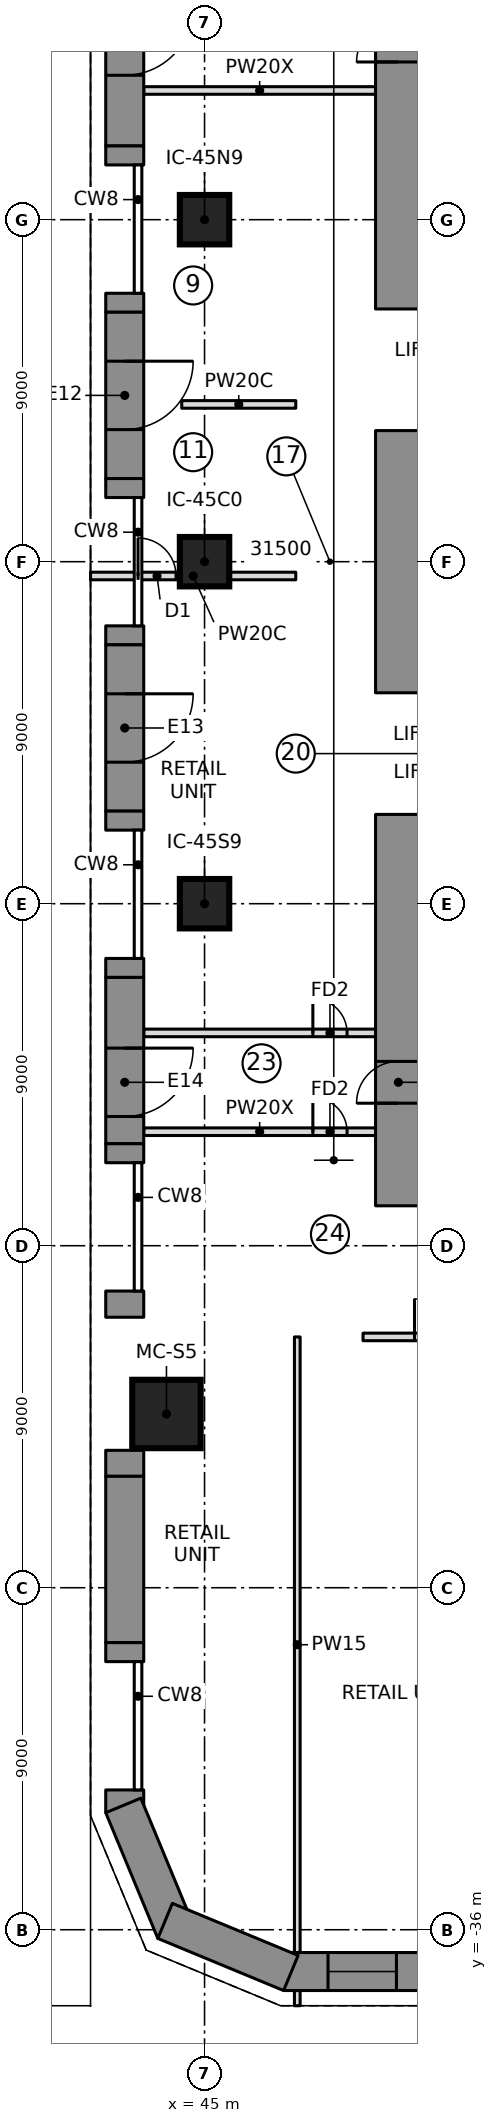
"""IFC4 building model, lengths in metres.
Left out: names, types, materials, properties, quantities, classifications, styles, units other than length and angle.
Written with IfcOpenShell. Run it as: python <this file> out.ifc"""

import sys

from ifc_helpers import new_model, si_unit, direction, frame, frame_2d, origin, origin_2d, place, context, subcontext, project, spatial, polyline, rectangle, outline, extrude, element, fill, save


model = new_model("IFC4")
c1 = context("Model", 3, precision=1e-05, world=origin(), true_north=direction((0.0, 1.0)))
c2 = subcontext(c1, "Body", "Model", "MODEL_VIEW")
j1 = project(units=[si_unit("LENGTHUNIT", "METRE"), si_unit("PLANEANGLEUNIT", "RADIAN")], contexts=[c1])
p1 = place(None, origin())
s1 = spatial("IfcSite", under=j1, at=p1, CompositionType="ELEMENT")
p2 = place(p1, origin())
s2 = spatial("IfcBuilding", under=s1, at=p2, CompositionType="ELEMENT")
p3 = place(p2, origin())
s3 = spatial("IfcBuildingStorey", under=s2, at=p3, CompositionType="ELEMENT", Elevation=0.0)
p4 = place(p3, frame((50.1, 6.65, 0.0), z_axis=(0.0, 0.0, 1.0), x_axis=(0.0, 1.0, 0.0)))
e1 = element("IfcWall", 1, at=p4, inside=s3, PredefinedType="SHEAR", context=c2, shape_type="SweptSolid", body=[
    extrude(rectangle(XDim=10.3, YDim=1.2, at=frame_2d((5.15, 0.0))), origin(), (0.0, 0.0, 1.0), 8.0),
])
p5 = place(p4, frame((6.5, 0.0, 0.0)))
e2 = element("IfcOpeningElement", 2, at=p5, cuts=e1, PredefinedType="OPENING", context=c2, shape_type="SweptSolid", body=[
    extrude(rectangle(XDim=1.1, YDim=2.1, at=frame_2d((0.55, 1.05))), frame((0.0, 0.61, 0.0), z_axis=(0.0, -1.0, 0.0), x_axis=(1.0, 0.0, 0.0)), (0.0, 0.0, 1.0), 1.22),
])
p6 = place(p3, frame((50.1, -3.45, 0.0), z_axis=(0.0, 0.0, 1.0), x_axis=(0.0, 1.0, 0.0)))
e3 = element("IfcWall", 3, at=p6, inside=s3, PredefinedType="SHEAR", context=c2, shape_type="SweptSolid", body=[
    extrude(rectangle(XDim=6.9, YDim=1.2, at=frame_2d((3.45, 0.0))), origin(), (0.0, 0.0, 1.0), 8.0),
])
p7 = place(p3, frame((50.1, -16.95, 0.0), z_axis=(0.0, 0.0, 1.0), x_axis=(0.0, 1.0, 0.0)))
e4 = element("IfcWall", 4, at=p7, inside=s3, PredefinedType="SHEAR", context=c2, shape_type="SweptSolid", body=[
    extrude(rectangle(XDim=10.3, YDim=1.2, at=frame_2d((5.15, 0.0))), origin(), (0.0, 0.0, 1.0), 8.0),
])
p8 = place(p7, frame((2.7, 0.0, 0.0)))
e5 = element("IfcOpeningElement", 5, at=p8, cuts=e4, PredefinedType="OPENING", context=c2, shape_type="SweptSolid", body=[
    extrude(rectangle(XDim=1.1, YDim=2.1, at=frame_2d((0.55, 1.05))), frame((0.0, 0.61, 0.0), z_axis=(0.0, -1.0, 0.0), x_axis=(1.0, 0.0, 0.0)), (0.0, 0.0, 1.0), 1.22),
])
p9 = place(p3, frame((43.998, -22.428, 0.0), z_axis=(0.0, 0.0, 1.0), x_axis=(1.0, 0.0, 0.0)))
e6 = element("IfcColumn", 6, at=p9, inside=s3, PredefinedType="COLUMN", context=c2, shape_type="SweptSolid", body=[
    extrude(rectangle(XDim=1.8, YDim=1.8, at=origin_2d()), origin(), (0.0, 0.0, 1.0), 8.0),
])
for number, where, z_axis, x_axis in (
    (7, (45.0, -9.0, 0.0), (0.0, 0.0, 1.0), (1.0, 0.0, 0.0)),
    (8, (45.0, 0.0, 0.0), (0.0, 0.0, 1.0), (1.0, 0.0, 0.0)),
    (9, (45.0, 9.0, 0.0), (0.0, 0.0, 1.0), (1.0, 0.0, 0.0)),
):
    element("IfcColumn", number, at=place(p3, frame(where, z_axis=z_axis, x_axis=x_axis)), inside=s3, PredefinedType="COLUMN", context=c2, shape_type="SweptSolid", body=[
        extrude(rectangle(XDim=1.3, YDim=1.3, at=origin_2d()), origin(), (0.0, 0.0, 1.0), 8.0),
    ])
p10 = place(p2, frame((0.0, 0.0, -10.0)))
s4 = spatial("IfcBuildingStorey", under=s2, at=p10, CompositionType="ELEMENT", Elevation=-10.0)
p11 = place(p10, frame((41.69, -21.429, -0.3), z_axis=(0.0, 0.0, 1.0), x_axis=(0.888406364692, -0.459057873449, 0.0)))
e10 = element("IfcWall", 10, at=p11, inside=s4, PredefinedType="SHEAR", context=c2, shape_type="SweptSolid", body=[
    extrude(rectangle(XDim=1.529, YDim=3.4, at=frame_2d((0.764, 0.0))), origin(), (0.0, 0.0, 1.0), 15.3),
])
p12 = place(p3, frame((47.179, -37.1, 0.0), z_axis=(0.0, 0.0, 1.0), x_axis=(1.0, 0.0, 0.0)))
e11 = element("IfcWall", 11, at=p12, inside=s3, PredefinedType="NOTDEFINED", context=c2, shape_type="SweptSolid", body=[
    extrude(outline(polyline([(-0.1, -0.5), (3.94, -0.5), (3.94, 0.5), (0.1, 0.5), (-0.1, -0.5)])), origin(), (0.0, 0.0, 1.0), 7.7),
])
p13 = place(p12, frame((1.07, 0.0, 0.9)))
e12 = element("IfcOpeningElement", 12, at=p13, cuts=e11, PredefinedType="OPENING", context=c2, shape_type="SweptSolid", body=[
    extrude(rectangle(XDim=1.8, YDim=2.4, at=frame_2d((0.9, 1.2))), frame((0.0, 0.51, 0.0), z_axis=(0.0, -1.0, 0.0), x_axis=(1.0, 0.0, 0.0)), (0.0, 0.0, 1.0), 1.02),
])
p14 = place(p3, frame((42.9, 15.316, 0.0), z_axis=(0.0, 0.0, 1.0), x_axis=(0.0, -1.0, 0.0)))
e13 = element("IfcWall", 13, at=p14, inside=s3, PredefinedType="NOTDEFINED", context=c2, shape_type="SweptSolid", body=[
    extrude(outline(polyline([(0.0, -0.5), (4.376, -0.5), (4.376, 0.5), (0.0, 0.5), (0.0, -0.5)])), origin(), (0.0, 0.0, 1.0), 7.7),
])
p15 = place(p14, frame((0.717, 0.0, 0.0)))
e14 = element("IfcOpeningElement", 14, at=p15, cuts=e13, PredefinedType="OPENING", context=c2, shape_type="SweptSolid", body=[
    extrude(rectangle(XDim=1.8, YDim=2.4, at=frame_2d((0.9, 1.2))), frame((0.0, 0.51, 0.0), z_axis=(0.0, -1.0, 0.0), x_axis=(1.0, 0.0, 0.0)), (0.0, 0.0, 1.0), 1.02),
])
for number, where, z_axis, x_axis in (
    (15, (42.9, 10.94, 0.0), (0.0, 0.0, 1.0), (0.0, -1.0, 0.0)),
    (16, (42.9, 7.064, 0.0), (0.0, 0.0, 1.0), (0.0, -1.0, 0.0)),
):
    element("IfcWall", number, at=place(p3, frame(where, z_axis=z_axis, x_axis=x_axis)), inside=s3, PredefinedType="NOTDEFINED", context=c2, shape_type="SweptSolid", body=[
        extrude(outline(polyline([(0.0, -0.5), (0.5, -0.5), (0.5, 0.5), (0.0, 0.5), (0.0, -0.5)])), origin(), (0.0, 0.0, 1.0), 7.7),
    ])
p16 = place(p3, frame((42.9, 6.564, 0.0), z_axis=(0.0, 0.0, 1.0), x_axis=(0.0, -1.0, 0.0)))
e17 = element("IfcWall", 17, at=p16, inside=s3, PredefinedType="NOTDEFINED", context=c2, shape_type="SweptSolid", body=[
    extrude(outline(polyline([(0.0, -0.5), (4.376, -0.5), (4.376, 0.5), (0.0, 0.5), (0.0, -0.5)])), origin(), (0.0, 0.0, 1.0), 7.7),
])
p17 = place(p16, frame((1.288, 0.0, 0.0)))
e18 = element("IfcOpeningElement", 18, at=p17, cuts=e17, PredefinedType="OPENING", context=c2, shape_type="SweptSolid", body=[
    extrude(rectangle(XDim=1.8, YDim=2.4, at=frame_2d((0.9, 1.2))), frame((0.0, 0.51, 0.0), z_axis=(0.0, -1.0, 0.0), x_axis=(1.0, 0.0, 0.0)), (0.0, 0.0, 1.0), 1.02),
])
for number, where, z_axis, x_axis in (
    (19, (42.9, 2.188, 0.0), (0.0, 0.0, 1.0), (0.0, -1.0, 0.0)),
    (20, (42.9, -1.688, 0.0), (0.0, 0.0, 1.0), (0.0, -1.0, 0.0)),
):
    element("IfcWall", number, at=place(p3, frame(where, z_axis=z_axis, x_axis=x_axis)), inside=s3, PredefinedType="NOTDEFINED", context=c2, shape_type="SweptSolid", body=[
        extrude(outline(polyline([(0.0, -0.5), (0.5, -0.5), (0.5, 0.5), (0.0, 0.5), (0.0, -0.5)])), origin(), (0.0, 0.0, 1.0), 7.7),
    ])
p18 = place(p3, frame((42.9, -2.188, 0.0), z_axis=(0.0, 0.0, 1.0), x_axis=(0.0, -1.0, 0.0)))
e21 = element("IfcWall", 21, at=p18, inside=s3, PredefinedType="NOTDEFINED", context=c2, shape_type="SweptSolid", body=[
    extrude(outline(polyline([(0.0, -0.5), (4.376, -0.5), (4.376, 0.5), (0.0, 0.5), (0.0, -0.5)])), origin(), (0.0, 0.0, 1.0), 7.7),
])
p19 = place(p18, frame((1.288, 0.0, 0.0)))
e22 = element("IfcOpeningElement", 22, at=p19, cuts=e21, PredefinedType="OPENING", context=c2, shape_type="SweptSolid", body=[
    extrude(rectangle(XDim=1.8, YDim=2.4, at=frame_2d((0.9, 1.2))), frame((0.0, 0.51, 0.0), z_axis=(0.0, -1.0, 0.0), x_axis=(1.0, 0.0, 0.0)), (0.0, 0.0, 1.0), 1.02),
])
for number, where, z_axis, x_axis in (
    (23, (42.9, -6.564, 0.0), (0.0, 0.0, 1.0), (0.0, -1.0, 0.0)),
    (24, (42.9, -10.44, 0.0), (0.0, 0.0, 1.0), (0.0, -1.0, 0.0)),
):
    element("IfcWall", number, at=place(p3, frame(where, z_axis=z_axis, x_axis=x_axis)), inside=s3, PredefinedType="NOTDEFINED", context=c2, shape_type="SweptSolid", body=[
        extrude(outline(polyline([(0.0, -0.5), (0.5, -0.5), (0.5, 0.5), (0.0, 0.5), (0.0, -0.5)])), origin(), (0.0, 0.0, 1.0), 7.7),
    ])
p20 = place(p3, frame((42.9, -10.94, 0.0), z_axis=(0.0, 0.0, 1.0), x_axis=(0.0, -1.0, 0.0)))
e25 = element("IfcWall", 25, at=p20, inside=s3, PredefinedType="NOTDEFINED", context=c2, shape_type="SweptSolid", body=[
    extrude(outline(polyline([(0.0, -0.5), (4.376, -0.5), (4.376, 0.5), (0.0, 0.5), (0.0, -0.5)])), origin(), (0.0, 0.0, 1.0), 7.7),
])
p21 = place(p20, frame((1.86, 0.0, 0.0)))
e26 = element("IfcOpeningElement", 26, at=p21, cuts=e25, PredefinedType="OPENING", context=c2, shape_type="SweptSolid", body=[
    extrude(rectangle(XDim=1.8, YDim=2.4, at=frame_2d((0.9, 1.2))), frame((0.0, 0.51, 0.0), z_axis=(0.0, -1.0, 0.0), x_axis=(1.0, 0.0, 0.0)), (0.0, 0.0, 1.0), 1.02),
])
p22 = place(p3, frame((42.9, -15.316, 0.0), z_axis=(0.0, 0.0, 1.0), x_axis=(0.0, -1.0, 0.0)))
e27 = element("IfcWall", 27, at=p22, inside=s3, PredefinedType="NOTDEFINED", context=c2, shape_type="SweptSolid", body=[
    extrude(outline(polyline([(0.0, -0.5), (0.5, -0.5), (0.5, 0.5), (0.0, 0.5), (0.0, -0.5)])), origin(), (0.0, 0.0, 1.0), 7.7),
])
p23 = place(p3, frame((42.9, -19.193, 0.0), z_axis=(0.0, 0.0, 1.0), x_axis=(0.0, -1.0, 0.0)))
e28 = element("IfcWall", 28, at=p23, inside=s3, PredefinedType="NOTDEFINED", context=c2, shape_type="SweptSolid", body=[
    extrude(outline(polyline([(0.0, -0.5), (0.69, -0.5), (1.207, 0.5), (0.0, 0.5), (0.0, -0.5)])), origin(), (0.0, 0.0, 1.0), 7.7),
])
p24 = place(p3, frame((42.9, -22.417, 0.0), z_axis=(0.0, 0.0, 1.0), x_axis=(0.0, -1.0, 0.0)))
e29 = element("IfcWall", 29, at=p24, inside=s3, PredefinedType="NOTDEFINED", context=c2, shape_type="SweptSolid", body=[
    extrude(outline(polyline([(0.968, -0.5), (1.652, -0.5), (1.652, 0.5), (-0.968, 0.5), (0.968, -0.5)])), origin(), (0.0, 0.0, 1.0), 7.7),
])
p25 = place(p3, frame((42.9, -24.069, 0.0), z_axis=(0.0, 0.0, 1.0), x_axis=(0.0, -1.0, 0.0)))
e30 = element("IfcWall", 30, at=p25, inside=s3, PredefinedType="NOTDEFINED", context=c2, shape_type="SweptSolid", body=[
    extrude(outline(polyline([(0.0, -0.5), (4.376, -0.5), (4.376, 0.5), (0.0, 0.5), (0.0, -0.5)])), origin(), (0.0, 0.0, 1.0), 7.7),
])
p26 = place(p3, frame((42.9, -28.445, 0.0), z_axis=(0.0, 0.0, 1.0), x_axis=(0.0, -1.0, 0.0)))
e31 = element("IfcWall", 31, at=p26, inside=s3, PredefinedType="NOTDEFINED", context=c2, shape_type="SweptSolid", body=[
    extrude(outline(polyline([(0.0, -0.5), (0.5, -0.5), (0.5, 0.5), (0.0, 0.5), (0.0, -0.5)])), origin(), (0.0, 0.0, 1.0), 7.7),
])
p27 = place(p3, frame((42.9, -32.321, 0.0), z_axis=(0.0, 0.0, 1.0), x_axis=(0.0, -1.0, 0.0)))
e32 = element("IfcWall", 32, at=p27, inside=s3, PredefinedType="NOTDEFINED", context=c2, shape_type="SweptSolid", body=[
    extrude(outline(polyline([(0.0, -0.5), (0.6, -0.5), (0.4, 0.5), (0.0, 0.5), (0.0, -0.5)])), origin(), (0.0, 0.0, 1.0), 7.7),
])
p28 = place(p3, frame((42.9, -32.821, 0.0), z_axis=(0.0, 0.0, 1.0), x_axis=(0.382724875529, -0.923862365102, 0.0)))
e33 = element("IfcWall", 33, at=p28, inside=s3, PredefinedType="NOTDEFINED", context=c2, shape_type="SweptSolid", body=[
    extrude(outline(polyline([(-0.1, -0.5), (3.482, -0.5), (3.068, 0.5), (0.1, 0.5), (-0.1, -0.5)])), origin(), (0.0, 0.0, 1.0), 7.7),
])
p29 = place(p3, frame((44.153, -35.847, 0.0), z_axis=(0.0, 0.0, 1.0), x_axis=(0.923862365102, -0.382724875529, 0.0)))
e34 = element("IfcWall", 34, at=p29, inside=s3, PredefinedType="NOTDEFINED", context=c2, shape_type="SweptSolid", body=[
    extrude(outline(polyline([(-0.207, -0.5), (3.375, -0.5), (3.175, 0.5), (0.207, 0.5), (-0.207, -0.5)])), origin(), (0.0, 0.0, 1.0), 7.7),
])
p30 = place(p3, frame((42.0, -0.376, 0.0), z_axis=(0.0, 0.0, 1.0), x_axis=(1.0, 0.0, 0.0)))
e35 = element("IfcWall", 35, at=p30, inside=s3, PredefinedType="PARTITIONING", context=c2, shape_type="SweptSolid", body=[
    extrude(rectangle(XDim=5.401, YDim=0.2, at=frame_2d((2.7, 0.0))), origin(), (0.0, 0.0, 1.0), 7.65),
])
p31 = place(p30, frame((1.25, 0.0, 0.0)))
e36 = element("IfcOpeningElement", 36, at=p31, cuts=e35, PredefinedType="OPENING", context=c2, shape_type="SweptSolid", body=[
    extrude(rectangle(XDim=1.0, YDim=2.1, at=frame_2d((0.5, 1.05))), frame((0.0, 0.11, 0.0), z_axis=(0.0, -1.0, 0.0), x_axis=(1.0, 0.0, 0.0)), (0.0, 0.0, 1.0), 0.22),
])
p32 = place(p3, frame((47.44, -38.0, 0.0), z_axis=(0.0, 0.0, 1.0), x_axis=(0.0, 1.0, 0.0)))
e37 = element("IfcWall", 37, at=p32, inside=s3, PredefinedType="PARTITIONING", context=c2, shape_type="SweptSolid", body=[
    extrude(rectangle(XDim=0.4, YDim=0.15, at=frame_2d((0.2, 0.0))), origin(), (0.0, 0.0, 1.0), 7.65),
])
p33 = place(p3, frame((47.44, -36.6, 0.0), z_axis=(0.0, 0.0, 1.0), x_axis=(0.0, 1.0, 0.0)))
e38 = element("IfcWall", 38, at=p33, inside=s3, PredefinedType="PARTITIONING", context=c2, shape_type="SweptSolid", body=[
    extrude(rectangle(XDim=16.2, YDim=0.15, at=frame_2d((8.1, 0.0))), origin(), (0.0, 0.0, 1.0), 7.65),
])
p34 = place(p3, frame((44.4, 4.139, 0.0), z_axis=(0.0, 0.0, 1.0), x_axis=(1.0, 0.0, 0.0)))
e39 = element("IfcWall", 39, at=p34, inside=s3, PredefinedType="PARTITIONING", context=c2, shape_type="SweptSolid", body=[
    extrude(rectangle(XDim=3.001, YDim=0.2, at=frame_2d((1.5, 0.0))), origin(), (0.0, 0.0, 1.0), 7.65),
])
p35 = place(p3, frame((49.17, -20.4, 0.0), z_axis=(0.0, 0.0, 1.0), x_axis=(1.0, 0.0, 0.0)))
e40 = element("IfcWall", 40, at=p35, inside=s3, PredefinedType="PARTITIONING", context=c2, shape_type="SweptSolid", body=[
    extrude(rectangle(XDim=3.71, YDim=0.2, at=frame_2d((1.855, 0.0))), origin(), (0.0, 0.0, 1.0), 7.65),
])
p36 = place(p35, frame((1.355, 0.0, 0.0)))
e41 = element("IfcOpeningElement", 41, at=p36, cuts=e40, PredefinedType="OPENING", context=c2, shape_type="SweptSolid", body=[
    extrude(rectangle(XDim=1.0, YDim=2.1, at=frame_2d((0.5, 1.05))), frame((0.0, 0.11, 0.0), z_axis=(0.0, -1.0, 0.0), x_axis=(1.0, 0.0, 0.0)), (0.0, 0.0, 1.0), 0.22),
])
p37 = place(p3, frame((43.4, 12.4, 0.0), z_axis=(0.0, 0.0, 1.0), x_axis=(1.0, 0.0, 0.0)))
e42 = element("IfcWall", 42, at=p37, inside=s3, PredefinedType="PARTITIONING", context=c2, shape_type="SweptSolid", body=[
    extrude(rectangle(XDim=6.1, YDim=0.2, at=frame_2d((3.05, 0.0))), origin(), (0.0, 0.0, 1.0), 7.65),
])
p38 = place(p3, frame((43.4, -15.0, 0.0), z_axis=(0.0, 0.0, 1.0), x_axis=(1.0, 0.0, 0.0)))
e43 = element("IfcWall", 43, at=p38, inside=s3, PredefinedType="PARTITIONING", context=c2, shape_type="SweptSolid", body=[
    extrude(rectangle(XDim=6.1, YDim=0.2, at=frame_2d((3.05, 0.0))), origin(), (0.0, 0.0, 1.0), 7.65),
])
p39 = place(p38, frame((4.45, 0.0, 0.0)))
e44 = element("IfcOpeningElement", 44, at=p39, cuts=e43, PredefinedType="OPENING", context=c2, shape_type="SweptSolid", body=[
    extrude(rectangle(XDim=0.9, YDim=2.1, at=frame_2d((0.45, 1.05))), frame((0.0, 0.11, 0.0), z_axis=(0.0, -1.0, 0.0), x_axis=(1.0, 0.0, 0.0)), (0.0, 0.0, 1.0), 0.22),
])
p40 = place(p3, frame((43.4, -12.4, 0.0), z_axis=(0.0, 0.0, 1.0), x_axis=(1.0, 0.0, 0.0)))
e45 = element("IfcWall", 45, at=p40, inside=s3, PredefinedType="PARTITIONING", context=c2, shape_type="SweptSolid", body=[
    extrude(rectangle(XDim=6.1, YDim=0.2, at=frame_2d((3.05, 0.0))), origin(), (0.0, 0.0, 1.0), 7.65),
])
p41 = place(p40, frame((4.45, 0.0, 0.0)))
e46 = element("IfcOpeningElement", 46, at=p41, cuts=e45, PredefinedType="OPENING", context=c2, shape_type="SweptSolid", body=[
    extrude(rectangle(XDim=0.9, YDim=2.1, at=frame_2d((0.45, 1.05))), frame((0.0, 0.11, 0.0), z_axis=(0.0, -1.0, 0.0), x_axis=(1.0, 0.0, 0.0)), (0.0, 0.0, 1.0), 0.22),
])
p42 = place(p13, origin())
e47 = element("IfcWindow", 47, at=p42, inside=s3, PartitioningType="SINGLE_PANEL", PredefinedType="WINDOW", context=c2, shape_type="SweptSolid", body=[
    extrude(rectangle(XDim=1.8, YDim=2.4, at=frame_2d((0.9, 1.2))), frame((0.0, 0.5, 0.0), z_axis=(0.0, -1.0, 0.0), x_axis=(1.0, 0.0, 0.0)), (0.0, 0.0, 1.0), 0.06),
])
fill(e12, e47)
p43 = place(p15, origin())
e48 = element("IfcDoor", 48, at=p43, inside=s3, OperationType="DOUBLE_DOOR_SINGLE_SWING", PredefinedType="DOOR", context=c2, shape_type="SweptSolid", body=[
    extrude(rectangle(XDim=1.8, YDim=2.4, at=frame_2d((0.9, 1.2))), frame((0.0, 0.495, 0.0), z_axis=(0.0, -1.0, 0.0), x_axis=(1.0, 0.0, 0.0)), (0.0, 0.0, 1.0), 0.05),
])
fill(e14, e48)
p44 = place(p17, origin())
e49 = element("IfcDoor", 49, at=p44, inside=s3, OperationType="DOUBLE_DOOR_SINGLE_SWING", PredefinedType="DOOR", context=c2, shape_type="SweptSolid", body=[
    extrude(rectangle(XDim=1.8, YDim=2.4, at=frame_2d((0.9, 1.2))), frame((0.0, 0.495, 0.0), z_axis=(0.0, -1.0, 0.0), x_axis=(1.0, 0.0, 0.0)), (0.0, 0.0, 1.0), 0.05),
])
fill(e18, e49)
p45 = place(p19, origin())
e50 = element("IfcDoor", 50, at=p45, inside=s3, OperationType="DOUBLE_DOOR_SINGLE_SWING", PredefinedType="DOOR", context=c2, shape_type="SweptSolid", body=[
    extrude(rectangle(XDim=1.8, YDim=2.4, at=frame_2d((0.9, 1.2))), frame((0.0, 0.495, 0.0), z_axis=(0.0, -1.0, 0.0), x_axis=(1.0, 0.0, 0.0)), (0.0, 0.0, 1.0), 0.05),
])
fill(e22, e50)
p46 = place(p21, origin())
e51 = element("IfcDoor", 51, at=p46, inside=s3, OperationType="DOUBLE_DOOR_SINGLE_SWING", PredefinedType="DOOR", context=c2, shape_type="SweptSolid", body=[
    extrude(rectangle(XDim=1.8, YDim=2.4, at=frame_2d((0.9, 1.2))), frame((0.0, 0.495, 0.0), z_axis=(0.0, -1.0, 0.0), x_axis=(1.0, 0.0, 0.0)), (0.0, 0.0, 1.0), 0.05),
])
fill(e26, e51)
p47 = place(p31, origin())
e52 = element("IfcDoor", 52, at=p47, inside=s3, OperationType="SINGLE_SWING_LEFT", PredefinedType="DOOR", context=c2, shape_type="SweptSolid", body=[
    extrude(rectangle(XDim=1.0, YDim=2.1, at=frame_2d((0.5, 1.05))), frame((0.0, 0.025, 0.0), z_axis=(0.0, -1.0, 0.0), x_axis=(1.0, 0.0, 0.0)), (0.0, 0.0, 1.0), 0.05),
])
fill(e36, e52)
p48 = place(p36, origin())
e53 = element("IfcDoor", 53, at=p48, inside=s3, OperationType="SINGLE_SWING_LEFT", PredefinedType="DOOR", context=c2, shape_type="SweptSolid", body=[
    extrude(rectangle(XDim=1.0, YDim=2.1, at=frame_2d((0.5, 1.05))), frame((0.0, 0.025, 0.0), z_axis=(0.0, -1.0, 0.0), x_axis=(1.0, 0.0, 0.0)), (0.0, 0.0, 1.0), 0.05),
])
fill(e41, e53)
p49 = place(p39, origin())
e54 = element("IfcDoor", 54, at=p49, inside=s3, OperationType="SINGLE_SWING_LEFT", PredefinedType="DOOR", context=c2, shape_type="SweptSolid", body=[
    extrude(rectangle(XDim=0.9, YDim=2.1, at=frame_2d((0.45, 1.05))), frame((0.0, 0.025, 0.0), z_axis=(0.0, -1.0, 0.0), x_axis=(1.0, 0.0, 0.0)), (0.0, 0.0, 1.0), 0.05),
])
fill(e44, e54)
p50 = place(p41, origin())
e55 = element("IfcDoor", 55, at=p50, inside=s3, OperationType="SINGLE_SWING_LEFT", PredefinedType="DOOR", context=c2, shape_type="SweptSolid", body=[
    extrude(rectangle(XDim=0.9, YDim=2.1, at=frame_2d((0.45, 1.05))), frame((0.0, 0.025, 0.0), z_axis=(0.0, -1.0, 0.0), x_axis=(1.0, 0.0, 0.0)), (0.0, 0.0, 1.0), 0.05),
])
fill(e46, e55)
p51 = place(p5, origin())
e56 = element("IfcDoor", 56, at=p51, inside=s3, OperationType="SINGLE_SWING_RIGHT", PredefinedType="DOOR", context=c2, shape_type="SweptSolid", body=[
    extrude(rectangle(XDim=1.1, YDim=2.1, at=frame_2d((0.55, 1.05))), frame((0.0, 0.025, 0.0), z_axis=(0.0, -1.0, 0.0), x_axis=(1.0, 0.0, 0.0)), (0.0, 0.0, 1.0), 0.05),
])
fill(e2, e56)
p52 = place(p8, origin())
e57 = element("IfcDoor", 57, at=p52, inside=s3, OperationType="SINGLE_SWING_RIGHT", PredefinedType="DOOR", context=c2, shape_type="SweptSolid", body=[
    extrude(rectangle(XDim=1.1, YDim=2.1, at=frame_2d((0.55, 1.05))), frame((0.0, 0.025, 0.0), z_axis=(0.0, -1.0, 0.0), x_axis=(1.0, 0.0, 0.0)), (0.0, 0.0, 1.0), 0.05),
])
fill(e5, e57)
save(model, sys.argv[1])
